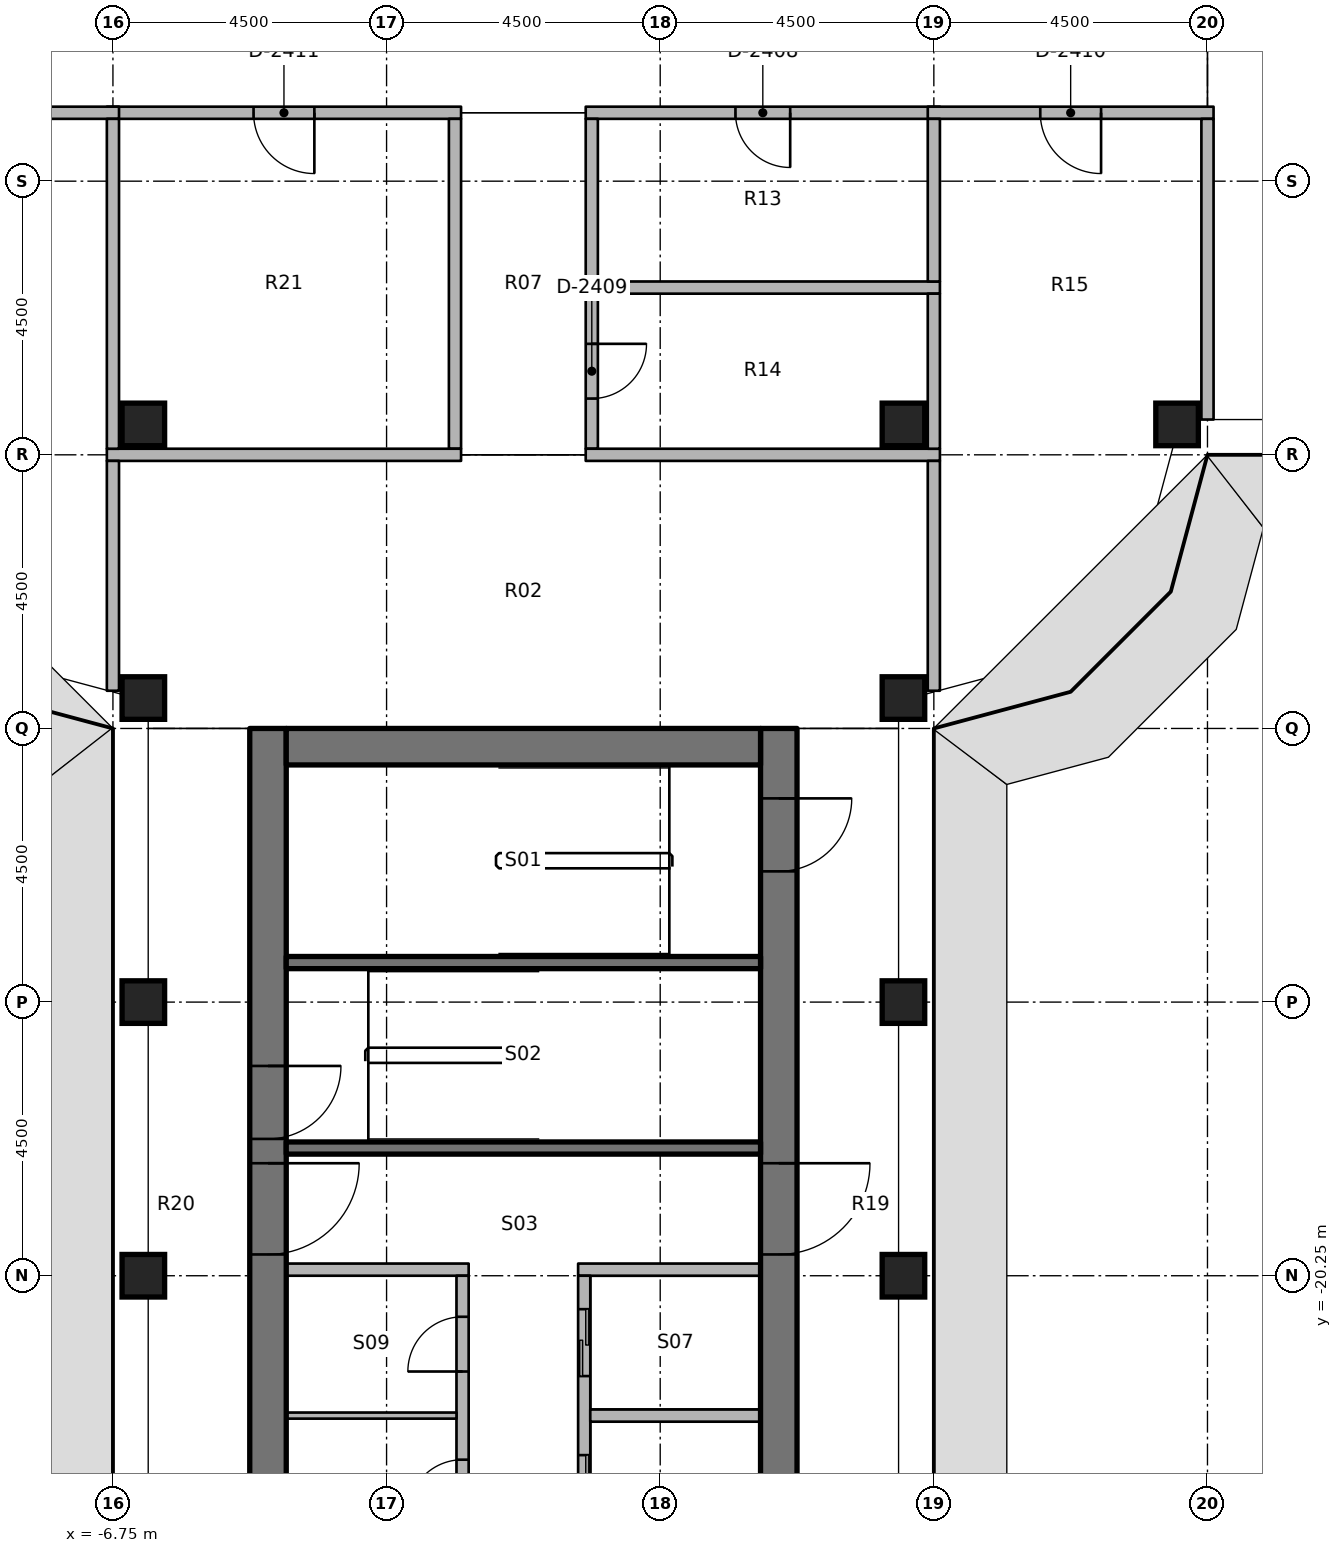
"""IFC4 building model, lengths in metres.
Left out: names, types, materials, properties, quantities, classifications, styles, units other than length and angle.
Written with IfcOpenShell. Run it as: python <this file> out.ifc"""

import sys

from ifc_helpers import new_model, si_unit, direction, frame, frame_2d, origin, origin_2d, place, context, subcontext, project, spatial, rectangle, extrude, element, fill, save


model = new_model("IFC4")
c1 = context("Model", 3, precision=1e-05, world=origin(), true_north=direction((0.0, 1.0)))
c2 = subcontext(c1, "Body", "Model", "MODEL_VIEW")
j1 = project(units=[si_unit("LENGTHUNIT", "METRE"), si_unit("PLANEANGLEUNIT", "RADIAN")], contexts=[c1])
p1 = place(None, origin())
s1 = spatial("IfcSite", under=j1, at=p1, CompositionType="ELEMENT")
p2 = place(p1, origin())
s2 = spatial("IfcBuilding", under=s1, at=p2, CompositionType="ELEMENT")
p3 = place(p2, frame((0.0, 0.0, 222.0)))
s3 = spatial("IfcBuildingStorey", under=s2, at=p3, CompositionType="ELEMENT", Elevation=222.0)
for number, where, z_axis, x_axis in (
    (1, (-6.25, -20.25, 0.0), (0.0, 0.0, 1.0), (1.0, 0.0, 0.0)),
    (2, (-6.25, -15.75, 0.0), (0.0, 0.0, 1.0), (1.0, 0.0, 0.0)),
    (3, (-6.25, -10.75, 0.0), (0.0, 0.0, 1.0), (1.0, 0.0, 0.0)),
    (4, (-6.25, -6.25, 0.0), (0.0, 0.0, 1.0), (1.0, 0.0, 0.0)),
    (5, (6.25, -20.25, 0.0), (0.0, 0.0, 1.0), (1.0, 0.0, 0.0)),
    (6, (6.25, -15.75, 0.0), (0.0, 0.0, 1.0), (1.0, 0.0, 0.0)),
    (7, (6.25, -10.75, 0.0), (0.0, 0.0, 1.0), (1.0, 0.0, 0.0)),
    (8, (6.25, -6.25, 0.0), (0.0, 0.0, 1.0), (1.0, 0.0, 0.0)),
    (9, (10.75, -6.25, 0.0), (0.0, 0.0, 1.0), (1.0, 0.0, 0.0)),
):
    element("IfcColumn", number, at=place(p3, frame(where, z_axis=z_axis, x_axis=x_axis)), inside=s3, PredefinedType="COLUMN", context=c2, shape_type="SweptSolid", body=[
        extrude(rectangle(XDim=0.7, YDim=0.7, at=origin_2d()), origin(), (0.0, 0.0, 1.0), 3.65),
    ])
p4 = place(p3, frame((-4.2, -11.25, 0.0), z_axis=(0.0, 0.0, 1.0), x_axis=(0.0, -1.0, 0.0)))
e10 = element("IfcWall", 10, at=p4, inside=s3, PredefinedType="SHEAR", context=c2, shape_type="SweptSolid", body=[
    extrude(rectangle(XDim=15.0, YDim=0.6, at=frame_2d((7.5, 0.0))), origin(), (0.0, 0.0, 1.0), 3.8),
])
p5 = place(p4, frame((7.15, 0.0, 0.0)))
e11 = element("IfcOpeningElement", 11, at=p5, cuts=e10, PredefinedType="OPENING", context=c2, shape_type="SweptSolid", body=[
    extrude(rectangle(XDim=1.5, YDim=2.3, at=frame_2d((0.75, 1.15))), frame((0.0, 0.31, 0.0), z_axis=(0.0, -1.0, 0.0), x_axis=(1.0, 0.0, 0.0)), (0.0, 0.0, 1.0), 0.62),
])
p6 = place(p4, frame((5.55, 0.0, 0.0)))
e12 = element("IfcOpeningElement", 12, at=p6, cuts=e10, PredefinedType="OPENING", context=c2, shape_type="SweptSolid", body=[
    extrude(rectangle(XDim=1.2, YDim=2.1, at=frame_2d((0.6, 1.05))), frame((0.0, 0.31, 0.0), z_axis=(0.0, -1.0, 0.0), x_axis=(1.0, 0.0, 0.0)), (0.0, 0.0, 1.0), 0.62),
])
p7 = place(p3, frame((4.2, -11.25, 0.0), z_axis=(0.0, 0.0, 1.0), x_axis=(0.0, -1.0, 0.0)))
e13 = element("IfcWall", 13, at=p7, inside=s3, PredefinedType="SHEAR", context=c2, shape_type="SweptSolid", body=[
    extrude(rectangle(XDim=15.0, YDim=0.6, at=frame_2d((7.5, 0.0))), origin(), (0.0, 0.0, 1.0), 3.8),
])
p8 = place(p7, frame((7.15, 0.0, 0.0)))
e14 = element("IfcOpeningElement", 14, at=p8, cuts=e13, PredefinedType="OPENING", context=c2, shape_type="SweptSolid", body=[
    extrude(rectangle(XDim=1.5, YDim=2.3, at=frame_2d((0.75, 1.15))), frame((0.0, 0.31, 0.0), z_axis=(0.0, -1.0, 0.0), x_axis=(1.0, 0.0, 0.0)), (0.0, 0.0, 1.0), 0.62),
])
p9 = place(p7, frame((13.9, 0.0, 0.0)))
e15 = element("IfcOpeningElement", 15, at=p9, cuts=e13, PredefinedType="OPENING", context=c2, shape_type="SweptSolid", body=[
    extrude(rectangle(XDim=0.9, YDim=2.1, at=frame_2d((0.45, 1.05))), frame((0.0, 0.31, 0.0), z_axis=(0.0, -1.0, 0.0), x_axis=(1.0, 0.0, 0.0)), (0.0, 0.0, 1.0), 0.62),
])
p10 = place(p7, frame((1.15, 0.0, 0.0)))
e16 = element("IfcOpeningElement", 16, at=p10, cuts=e13, PredefinedType="OPENING", context=c2, shape_type="SweptSolid", body=[
    extrude(rectangle(XDim=1.2, YDim=2.1, at=frame_2d((0.6, 1.05))), frame((0.0, 0.31, 0.0), z_axis=(0.0, -1.0, 0.0), x_axis=(1.0, 0.0, 0.0)), (0.0, 0.0, 1.0), 0.62),
])
p11 = place(p3, frame((-3.9, -11.55, 0.0), z_axis=(0.0, 0.0, 1.0), x_axis=(1.0, 0.0, 0.0)))
e17 = element("IfcWall", 17, at=p11, inside=s3, PredefinedType="SHEAR", context=c2, shape_type="SweptSolid", body=[
    extrude(rectangle(XDim=7.8, YDim=0.6, at=frame_2d((3.9, 0.0))), origin(), (0.0, 0.0, 1.0), 3.8),
])
for number, where, z_axis, x_axis in (
    (18, (3.9, -18.15, 0.0), (0.0, 0.0, 1.0), (-1.0, 0.0, 0.0)),
    (19, (3.9, -15.1, 0.0), (0.0, 0.0, 1.0), (-1.0, 0.0, 0.0)),
):
    element("IfcWall", number, at=place(p3, frame(where, z_axis=z_axis, x_axis=x_axis)), inside=s3, PredefinedType="SHEAR", context=c2, shape_type="SweptSolid", body=[
        extrude(rectangle(XDim=7.8, YDim=0.2, at=frame_2d((3.9, 0.0))), origin(), (0.0, 0.0, 1.0), 3.65),
    ])
p12 = place(p3, frame((3.9, -20.15, 0.0), z_axis=(0.0, 0.0, 1.0), x_axis=(-1.0, 0.0, 0.0)))
e20 = element("IfcWall", 20, at=p12, inside=s3, PredefinedType="PARTITIONING", context=c2, shape_type="SweptSolid", body=[
    extrude(rectangle(XDim=3.0, YDim=0.2, at=frame_2d((1.5, 0.0))), origin(), (0.0, 0.0, 1.0), 3.65),
])
p13 = place(p3, frame((1.0, -24.85, 0.0), z_axis=(0.0, 0.0, 1.0), x_axis=(0.0, 1.0, 0.0)))
e21 = element("IfcWall", 21, at=p13, inside=s3, PredefinedType="PARTITIONING", context=c2, shape_type="SweptSolid", body=[
    extrude(rectangle(XDim=4.6, YDim=0.2, at=frame_2d((2.3, 0.0))), origin(), (0.0, 0.0, 1.0), 3.65),
])
p14 = place(p13, frame((0.55, 0.0, 0.0)))
e22 = element("IfcOpeningElement", 22, at=p14, cuts=e21, PredefinedType="OPENING", context=c2, shape_type="SweptSolid", body=[
    extrude(rectangle(XDim=1.1, YDim=2.3, at=frame_2d((0.55, 1.15))), frame((0.0, 0.11, 0.0), z_axis=(0.0, -1.0, 0.0), x_axis=(1.0, 0.0, 0.0)), (0.0, 0.0, 1.0), 0.22),
])
p15 = place(p13, frame((2.95, 0.0, 0.0)))
e23 = element("IfcOpeningElement", 23, at=p15, cuts=e21, PredefinedType="OPENING", context=c2, shape_type="SweptSolid", body=[
    extrude(rectangle(XDim=1.1, YDim=2.3, at=frame_2d((0.55, 1.15))), frame((0.0, 0.11, 0.0), z_axis=(0.0, -1.0, 0.0), x_axis=(1.0, 0.0, 0.0)), (0.0, 0.0, 1.0), 0.22),
])
p16 = place(p3, frame((-0.9, -20.15, 0.0), z_axis=(0.0, 0.0, 1.0), x_axis=(-1.0, 0.0, 0.0)))
e24 = element("IfcWall", 24, at=p16, inside=s3, PredefinedType="PARTITIONING", context=c2, shape_type="SweptSolid", body=[
    extrude(rectangle(XDim=3.0, YDim=0.2, at=frame_2d((1.5, 0.0))), origin(), (0.0, 0.0, 1.0), 3.65),
])
p17 = place(p3, frame((-1.0, -24.85, 0.0), z_axis=(0.0, 0.0, 1.0), x_axis=(0.0, 1.0, 0.0)))
e25 = element("IfcWall", 25, at=p17, inside=s3, PredefinedType="PARTITIONING", context=c2, shape_type="SweptSolid", body=[
    extrude(rectangle(XDim=4.6, YDim=0.2, at=frame_2d((2.3, 0.0))), origin(), (0.0, 0.0, 1.0), 3.65),
])
p18 = place(p17, frame((0.675, 0.0, 0.0)))
e26 = element("IfcOpeningElement", 26, at=p18, cuts=e25, PredefinedType="OPENING", context=c2, shape_type="SweptSolid", body=[
    extrude(rectangle(XDim=0.9, YDim=2.1, at=frame_2d((0.45, 1.05))), frame((0.0, 0.11, 0.0), z_axis=(0.0, -1.0, 0.0), x_axis=(1.0, 0.0, 0.0)), (0.0, 0.0, 1.0), 0.22),
])
p19 = place(p17, frame((3.025, 0.0, 0.0)))
e27 = element("IfcOpeningElement", 27, at=p19, cuts=e25, PredefinedType="OPENING", context=c2, shape_type="SweptSolid", body=[
    extrude(rectangle(XDim=0.9, YDim=2.1, at=frame_2d((0.45, 1.05))), frame((0.0, 0.11, 0.0), z_axis=(0.0, -1.0, 0.0), x_axis=(1.0, 0.0, 0.0)), (0.0, 0.0, 1.0), 0.22),
])
p20 = place(p3, frame((3.9, -22.55, 0.0), z_axis=(0.0, 0.0, 1.0), x_axis=(-1.0, 0.0, 0.0)))
e28 = element("IfcWall", 28, at=p20, inside=s3, PredefinedType="PARTITIONING", context=c2, shape_type="SweptSolid", body=[
    extrude(rectangle(XDim=2.8, YDim=0.2, at=frame_2d((1.4, 0.0))), origin(), (0.0, 0.0, 1.0), 3.65),
])
p21 = place(p3, frame((-1.1, -22.55, 0.0), z_axis=(0.0, 0.0, 1.0), x_axis=(-1.0, 0.0, 0.0)))
e29 = element("IfcWall", 29, at=p21, inside=s3, PredefinedType="PARTITIONING", context=c2, shape_type="SweptSolid", body=[
    extrude(rectangle(XDim=2.8, YDim=0.1, at=frame_2d((1.4, 0.0))), origin(), (0.0, 0.0, 1.0), 3.65),
])
p22 = place(p3, frame((6.85, -1.125, 0.0), z_axis=(0.0, 0.0, 1.0), x_axis=(-1.0, 0.0, 0.0)))
e30 = element("IfcWall", 30, at=p22, inside=s3, PredefinedType="PARTITIONING", context=c2, shape_type="SweptSolid", body=[
    extrude(rectangle(XDim=5.825, YDim=0.2, at=frame_2d((2.913, 0.0))), origin(), (0.0, 0.0, 1.0), 2.75),
])
p23 = place(p22, frame((2.462, 0.0, 0.0)))
e31 = element("IfcOpeningElement", 31, at=p23, cuts=e30, PredefinedType="OPENING", context=c2, shape_type="SweptSolid", body=[
    extrude(rectangle(XDim=0.9, YDim=2.1, at=frame_2d((0.45, 1.05))), frame((0.0, 0.11, 0.0), z_axis=(0.0, -1.0, 0.0), x_axis=(1.0, 0.0, 0.0)), (0.0, 0.0, 1.0), 0.22),
])
p24 = place(p3, frame((11.35, -1.125, 0.0), z_axis=(0.0, 0.0, 1.0), x_axis=(-1.0, 0.0, 0.0)))
e32 = element("IfcWall", 32, at=p24, inside=s3, PredefinedType="PARTITIONING", context=c2, shape_type="SweptSolid", body=[
    extrude(rectangle(XDim=4.7, YDim=0.2, at=frame_2d((2.35, 0.0))), origin(), (0.0, 0.0, 1.0), 2.75),
])
p25 = place(p24, frame((1.85, 0.0, 0.0)))
e33 = element("IfcOpeningElement", 33, at=p25, cuts=e32, PredefinedType="OPENING", context=c2, shape_type="SweptSolid", body=[
    extrude(rectangle(XDim=1.0, YDim=2.1, at=frame_2d((0.5, 1.05))), frame((0.0, 0.11, 0.0), z_axis=(0.0, -1.0, 0.0), x_axis=(1.0, 0.0, 0.0)), (0.0, 0.0, 1.0), 0.22),
])
p26 = place(p3, frame((-1.025, -1.125, 0.0), z_axis=(0.0, 0.0, 1.0), x_axis=(-1.0, 0.0, 0.0)))
e34 = element("IfcWall", 34, at=p26, inside=s3, PredefinedType="PARTITIONING", context=c2, shape_type="SweptSolid", body=[
    extrude(rectangle(XDim=5.825, YDim=0.2, at=frame_2d((2.913, 0.0))), origin(), (0.0, 0.0, 1.0), 2.75),
])
p27 = place(p26, frame((2.413, 0.0, 0.0)))
e35 = element("IfcOpeningElement", 35, at=p27, cuts=e34, PredefinedType="OPENING", context=c2, shape_type="SweptSolid", body=[
    extrude(rectangle(XDim=1.0, YDim=2.1, at=frame_2d((0.5, 1.05))), frame((0.0, 0.11, 0.0), z_axis=(0.0, -1.0, 0.0), x_axis=(1.0, 0.0, 0.0)), (0.0, 0.0, 1.0), 0.22),
])
p28 = place(p3, frame((-6.65, -1.125, 0.0), z_axis=(0.0, 0.0, 1.0), x_axis=(-1.0, 0.0, 0.0)))
e36 = element("IfcWall", 36, at=p28, inside=s3, PredefinedType="PARTITIONING", context=c2, shape_type="SweptSolid", body=[
    extrude(rectangle(XDim=4.7, YDim=0.2, at=frame_2d((2.35, 0.0))), origin(), (0.0, 0.0, 1.0), 2.75),
])
p29 = place(p28, frame((1.85, 0.0, 0.0)))
e37 = element("IfcOpeningElement", 37, at=p29, cuts=e36, PredefinedType="OPENING", context=c2, shape_type="SweptSolid", body=[
    extrude(rectangle(XDim=1.0, YDim=2.1, at=frame_2d((0.5, 1.05))), frame((0.0, 0.11, 0.0), z_axis=(0.0, -1.0, 0.0), x_axis=(1.0, 0.0, 0.0)), (0.0, 0.0, 1.0), 0.22),
])
p30 = place(p3, frame((1.125, -3.9, 0.0), z_axis=(0.0, 0.0, 1.0), x_axis=(0.0, 1.0, 0.0)))
e38 = element("IfcWall", 38, at=p30, inside=s3, PredefinedType="PARTITIONING", context=c2, shape_type="SweptSolid", body=[
    extrude(rectangle(XDim=2.675, YDim=0.2, at=frame_2d((1.337, 0.0))), origin(), (0.0, 0.0, 1.0), 2.75),
])
p31 = place(p3, frame((1.125, -4.1, 0.0), z_axis=(0.0, 0.0, 1.0), x_axis=(0.0, -1.0, 0.0)))
e39 = element("IfcWall", 39, at=p31, inside=s3, PredefinedType="PARTITIONING", context=c2, shape_type="SweptSolid", body=[
    extrude(rectangle(XDim=2.55, YDim=0.2, at=frame_2d((1.275, 0.0))), origin(), (0.0, 0.0, 1.0), 2.75),
])
p32 = place(p31, frame((0.825, 0.0, 0.0)))
e40 = element("IfcOpeningElement", 40, at=p32, cuts=e39, PredefinedType="OPENING", context=c2, shape_type="SweptSolid", body=[
    extrude(rectangle(XDim=0.9, YDim=2.1, at=frame_2d((0.45, 1.05))), frame((0.0, 0.11, 0.0), z_axis=(0.0, -1.0, 0.0), x_axis=(1.0, 0.0, 0.0)), (0.0, 0.0, 1.0), 0.22),
])
p33 = place(p3, frame((-1.125, -6.65, 0.0), z_axis=(0.0, 0.0, 1.0), x_axis=(0.0, 1.0, 0.0)))
e41 = element("IfcWall", 41, at=p33, inside=s3, PredefinedType="PARTITIONING", context=c2, shape_type="SweptSolid", body=[
    extrude(rectangle(XDim=5.425, YDim=0.2, at=frame_2d((2.712, 0.0))), origin(), (0.0, 0.0, 1.0), 2.75),
])
p34 = place(p3, frame((1.025, -6.75, 0.0), z_axis=(0.0, 0.0, 1.0), x_axis=(1.0, 0.0, 0.0)))
e42 = element("IfcWall", 42, at=p34, inside=s3, PredefinedType="PARTITIONING", context=c2, shape_type="SweptSolid", body=[
    extrude(rectangle(XDim=5.825, YDim=0.2, at=frame_2d((2.913, 0.0))), origin(), (0.0, 0.0, 1.0), 2.75),
])
p35 = place(p3, frame((6.75, -10.63, 0.0), z_axis=(0.0, 0.0, 1.0), x_axis=(0.0, 1.0, 0.0)))
e43 = element("IfcWall", 43, at=p35, inside=s3, PredefinedType="PARTITIONING", context=c2, shape_type="SweptSolid", body=[
    extrude(rectangle(XDim=3.78, YDim=0.2, at=frame_2d((1.89, 0.0))), origin(), (0.0, 0.0, 1.0), 2.75),
])
p36 = place(p3, frame((-6.85, -6.75, 0.0), z_axis=(0.0, 0.0, 1.0), x_axis=(1.0, 0.0, 0.0)))
e44 = element("IfcWall", 44, at=p36, inside=s3, PredefinedType="PARTITIONING", context=c2, shape_type="SweptSolid", body=[
    extrude(rectangle(XDim=5.825, YDim=0.2, at=frame_2d((2.913, 0.0))), origin(), (0.0, 0.0, 1.0), 2.75),
])
p37 = place(p3, frame((-6.75, -10.63, 0.0), z_axis=(0.0, 0.0, 1.0), x_axis=(0.0, 1.0, 0.0)))
e45 = element("IfcWall", 45, at=p37, inside=s3, PredefinedType="PARTITIONING", context=c2, shape_type="SweptSolid", body=[
    extrude(rectangle(XDim=3.78, YDim=0.2, at=frame_2d((1.89, 0.0))), origin(), (0.0, 0.0, 1.0), 2.75),
])
p38 = place(p3, frame((1.025, -4.0, 0.0), z_axis=(0.0, 0.0, 1.0), x_axis=(1.0, 0.0, 0.0)))
e46 = element("IfcWall", 46, at=p38, inside=s3, PredefinedType="PARTITIONING", context=c2, shape_type="SweptSolid", body=[
    extrude(rectangle(XDim=5.825, YDim=0.2, at=frame_2d((2.913, 0.0))), origin(), (0.0, 0.0, 1.0), 2.75),
])
p39 = place(p3, frame((6.75, -3.9, 0.0), z_axis=(0.0, 0.0, 1.0), x_axis=(0.0, 1.0, 0.0)))
e47 = element("IfcWall", 47, at=p39, inside=s3, PredefinedType="PARTITIONING", context=c2, shape_type="SweptSolid", body=[
    extrude(rectangle(XDim=2.675, YDim=0.2, at=frame_2d((1.337, 0.0))), origin(), (0.0, 0.0, 1.0), 2.75),
])
p40 = place(p3, frame((6.75, -6.65, 0.0), z_axis=(0.0, 0.0, 1.0), x_axis=(0.0, 1.0, 0.0)))
e48 = element("IfcWall", 48, at=p40, inside=s3, PredefinedType="PARTITIONING", context=c2, shape_type="SweptSolid", body=[
    extrude(rectangle(XDim=2.55, YDim=0.2, at=frame_2d((1.275, 0.0))), origin(), (0.0, 0.0, 1.0), 2.75),
])
p41 = place(p3, frame((11.25, -6.17, 0.0), z_axis=(0.0, 0.0, 1.0), x_axis=(0.0, 1.0, 0.0)))
e49 = element("IfcWall", 49, at=p41, inside=s3, PredefinedType="PARTITIONING", context=c2, shape_type="SweptSolid", body=[
    extrude(rectangle(XDim=4.945, YDim=0.2, at=frame_2d((2.472, 0.0))), origin(), (0.0, 0.0, 1.0), 2.75),
])
p42 = place(p3, frame((-6.75, -6.65, 0.0), z_axis=(0.0, 0.0, 1.0), x_axis=(0.0, 1.0, 0.0)))
e50 = element("IfcWall", 50, at=p42, inside=s3, PredefinedType="PARTITIONING", context=c2, shape_type="SweptSolid", body=[
    extrude(rectangle(XDim=5.425, YDim=0.2, at=frame_2d((2.712, 0.0))), origin(), (0.0, 0.0, 1.0), 2.75),
])
p43 = place(p8, origin())
e51 = element("IfcDoor", 51, at=p43, inside=s3, OperationType="DOUBLE_DOOR_SINGLE_SWING", PredefinedType="DOOR", context=c2, shape_type="SweptSolid", body=[
    extrude(rectangle(XDim=1.5, YDim=2.3, at=frame_2d((0.75, 1.15))), frame((0.0, 0.025, 0.0), z_axis=(0.0, -1.0, 0.0), x_axis=(1.0, 0.0, 0.0)), (0.0, 0.0, 1.0), 0.05),
])
fill(e14, e51)
p44 = place(p5, origin())
e52 = element("IfcDoor", 52, at=p44, inside=s3, OperationType="DOUBLE_DOOR_SINGLE_SWING", PredefinedType="DOOR", context=c2, shape_type="SweptSolid", body=[
    extrude(rectangle(XDim=1.5, YDim=2.3, at=frame_2d((0.75, 1.15))), frame((0.0, 0.025, 0.0), z_axis=(0.0, -1.0, 0.0), x_axis=(1.0, 0.0, 0.0)), (0.0, 0.0, 1.0), 0.05),
])
fill(e11, e52)
p45 = place(p6, origin())
e53 = element("IfcDoor", 53, at=p45, inside=s3, OperationType="SINGLE_SWING_RIGHT", PredefinedType="DOOR", context=c2, shape_type="SweptSolid", body=[
    extrude(rectangle(XDim=1.2, YDim=2.1, at=frame_2d((0.6, 1.05))), frame((0.0, 0.025, 0.0), z_axis=(0.0, -1.0, 0.0), x_axis=(1.0, 0.0, 0.0)), (0.0, 0.0, 1.0), 0.05),
])
fill(e12, e53)
p46 = place(p10, origin())
e54 = element("IfcDoor", 54, at=p46, inside=s3, OperationType="SINGLE_SWING_RIGHT", PredefinedType="DOOR", context=c2, shape_type="SweptSolid", body=[
    extrude(rectangle(XDim=1.2, YDim=2.1, at=frame_2d((0.6, 1.05))), frame((0.0, 0.025, 0.0), z_axis=(0.0, -1.0, 0.0), x_axis=(1.0, 0.0, 0.0)), (0.0, 0.0, 1.0), 0.05),
])
fill(e16, e54)
p47 = place(p14, origin())
e55 = element("IfcDoor", 55, at=p47, inside=s3, OperationType="DOUBLE_DOOR_SLIDING", PredefinedType="DOOR", context=c2, shape_type="SweptSolid", body=[
    extrude(rectangle(XDim=1.1, YDim=2.3, at=frame_2d((0.55, 1.15))), frame((0.0, 0.025, 0.0), z_axis=(0.0, -1.0, 0.0), x_axis=(1.0, 0.0, 0.0)), (0.0, 0.0, 1.0), 0.05),
])
fill(e22, e55)
p48 = place(p15, origin())
e56 = element("IfcDoor", 56, at=p48, inside=s3, OperationType="DOUBLE_DOOR_SLIDING", PredefinedType="DOOR", context=c2, shape_type="SweptSolid", body=[
    extrude(rectangle(XDim=1.1, YDim=2.3, at=frame_2d((0.55, 1.15))), frame((0.0, 0.025, 0.0), z_axis=(0.0, -1.0, 0.0), x_axis=(1.0, 0.0, 0.0)), (0.0, 0.0, 1.0), 0.05),
])
fill(e23, e56)
p49 = place(p18, origin())
e57 = element("IfcDoor", 57, at=p49, inside=s3, OperationType="SINGLE_SWING_LEFT", PredefinedType="DOOR", context=c2, shape_type="SweptSolid", body=[
    extrude(rectangle(XDim=0.9, YDim=2.1, at=frame_2d((0.45, 1.05))), frame((0.0, 0.025, 0.0), z_axis=(0.0, -1.0, 0.0), x_axis=(1.0, 0.0, 0.0)), (0.0, 0.0, 1.0), 0.05),
])
fill(e26, e57)
p50 = place(p19, origin())
e58 = element("IfcDoor", 58, at=p50, inside=s3, OperationType="SINGLE_SWING_RIGHT", PredefinedType="DOOR", context=c2, shape_type="SweptSolid", body=[
    extrude(rectangle(XDim=0.9, YDim=2.1, at=frame_2d((0.45, 1.05))), frame((0.0, 0.025, 0.0), z_axis=(0.0, -1.0, 0.0), x_axis=(1.0, 0.0, 0.0)), (0.0, 0.0, 1.0), 0.05),
])
fill(e27, e58)
p51 = place(p23, origin())
e59 = element("IfcDoor", 59, at=p51, inside=s3, OperationType="SINGLE_SWING_RIGHT", PredefinedType="DOOR", context=c2, shape_type="SweptSolid", body=[
    extrude(rectangle(XDim=0.9, YDim=2.1, at=frame_2d((0.45, 1.05))), frame((0.0, 0.025, 0.0), z_axis=(0.0, -1.0, 0.0), x_axis=(1.0, 0.0, 0.0)), (0.0, 0.0, 1.0), 0.05),
])
fill(e31, e59)
p52 = place(p32, origin())
e60 = element("IfcDoor", 60, at=p52, inside=s3, OperationType="SINGLE_SWING_RIGHT", PredefinedType="DOOR", context=c2, shape_type="SweptSolid", body=[
    extrude(rectangle(XDim=0.9, YDim=2.1, at=frame_2d((0.45, 1.05))), frame((0.0, 0.025, 0.0), z_axis=(0.0, -1.0, 0.0), x_axis=(1.0, 0.0, 0.0)), (0.0, 0.0, 1.0), 0.05),
])
fill(e40, e60)
p53 = place(p25, origin())
e61 = element("IfcDoor", 61, at=p53, inside=s3, OperationType="SINGLE_SWING_RIGHT", PredefinedType="DOOR", context=c2, shape_type="SweptSolid", body=[
    extrude(rectangle(XDim=1.0, YDim=2.1, at=frame_2d((0.5, 1.05))), frame((0.0, 0.025, 0.0), z_axis=(0.0, -1.0, 0.0), x_axis=(1.0, 0.0, 0.0)), (0.0, 0.0, 1.0), 0.05),
])
fill(e33, e61)
p54 = place(p27, origin())
e62 = element("IfcDoor", 62, at=p54, inside=s3, OperationType="SINGLE_SWING_RIGHT", PredefinedType="DOOR", context=c2, shape_type="SweptSolid", body=[
    extrude(rectangle(XDim=1.0, YDim=2.1, at=frame_2d((0.5, 1.05))), frame((0.0, 0.025, 0.0), z_axis=(0.0, -1.0, 0.0), x_axis=(1.0, 0.0, 0.0)), (0.0, 0.0, 1.0), 0.05),
])
fill(e35, e62)
save(model, sys.argv[1])
